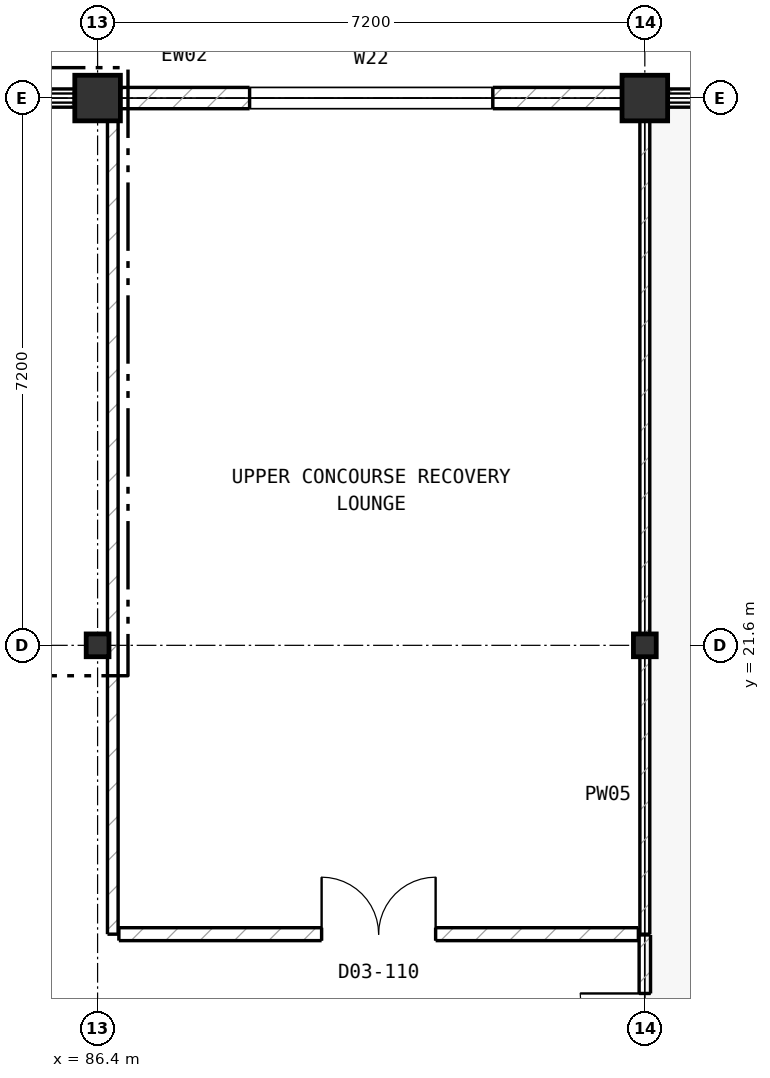
"""IFC4 building model, lengths in metres.
Left out: names, types, materials, properties, quantities, classifications, styles, units other than length and angle.
Written with IfcOpenShell. Run it as: python <this file> out.ifc"""

import sys

from ifc_helpers import new_model, si_unit, direction, frame, frame_2d, origin, origin_2d, place, context, subcontext, project, spatial, rectangle, hollow_rectangle, extrude, element, fill, save


model = new_model("IFC4")
c1 = context("Model", 3, precision=1e-05, world=origin(), true_north=direction((0.0, 1.0)))
c2 = subcontext(c1, "Body", "Model", "MODEL_VIEW")
j1 = project(units=[si_unit("LENGTHUNIT", "METRE"), si_unit("PLANEANGLEUNIT", "RADIAN")], contexts=[c1])
p1 = place(None, origin())
s1 = spatial("IfcSite", under=j1, at=p1, CompositionType="ELEMENT")
p2 = place(p1, origin())
s2 = spatial("IfcBuilding", under=s1, at=p2, CompositionType="ELEMENT")
p3 = place(p2, frame((0.0, 0.0, 16.0)))
s3 = spatial("IfcBuildingStorey", under=s2, at=p3, CompositionType="ELEMENT", Elevation=16.0)
p4 = place(p3, frame((86.4, 21.6, 0.0), z_axis=(0.0, 0.0, 1.0), x_axis=(1.0, 0.0, 0.0)))
e1 = element("IfcColumn", 1, at=p4, inside=s3, PredefinedType="COLUMN", context=c2, shape_type="SweptSolid", body=[
    extrude(hollow_rectangle(XDim=0.3, YDim=0.3, WallThickness=0.012, at=origin_2d()), origin(), (0.0, 0.0, 1.0), 4.4),
])
p5 = place(p3, frame((86.4, 28.8, 0.0), z_axis=(0.0, 0.0, 1.0), x_axis=(1.0, 0.0, 0.0)))
e2 = element("IfcColumn", 2, at=p5, inside=s3, PredefinedType="COLUMN", context=c2, shape_type="SweptSolid", body=[
    extrude(rectangle(XDim=0.6, YDim=0.6, at=origin_2d()), origin(), (0.0, 0.0, 1.0), 4.4),
])
p6 = place(p3, frame((93.6, 21.6, 0.0), z_axis=(0.0, 0.0, 1.0), x_axis=(1.0, 0.0, 0.0)))
e3 = element("IfcColumn", 3, at=p6, inside=s3, PredefinedType="COLUMN", context=c2, shape_type="SweptSolid", body=[
    extrude(hollow_rectangle(XDim=0.3, YDim=0.3, WallThickness=0.012, at=origin_2d()), origin(), (0.0, 0.0, 1.0), 4.4),
])
p7 = place(p3, frame((93.6, 28.8, 0.0), z_axis=(0.0, 0.0, 1.0), x_axis=(1.0, 0.0, 0.0)))
e4 = element("IfcColumn", 4, at=p7, inside=s3, PredefinedType="COLUMN", context=c2, shape_type="SweptSolid", body=[
    extrude(rectangle(XDim=0.6, YDim=0.6, at=origin_2d()), origin(), (0.0, 0.0, 1.0), 4.4),
])
p8 = place(p3, frame((79.485, 28.8, 0.0), z_axis=(0.0, 0.0, 1.0), x_axis=(1.0, 0.0, 0.0)))
e5 = element("IfcWall", 5, at=p8, inside=s3, PredefinedType="SOLIDWALL", context=c2, shape_type="SweptSolid", body=[
    extrude(rectangle(XDim=6.63, YDim=0.24, at=frame_2d((3.315, 0.0))), origin(), (0.0, 0.0, 1.0), 0.9),
])
p9 = place(p3, frame((86.685, 28.8, 0.0), z_axis=(0.0, 0.0, 1.0), x_axis=(1.0, 0.0, 0.0)))
e6 = element("IfcWall", 6, at=p9, inside=s3, PredefinedType="SOLIDWALL", context=c2, shape_type="SweptSolid", body=[
    extrude(rectangle(XDim=6.63, YDim=0.28, at=frame_2d((3.315, 0.0))), origin(), (0.0, 0.0, 1.0), 4.12),
])
p10 = place(p9, frame((1.715, 0.0, 2.15)))
e7 = element("IfcOpeningElement", 7, at=p10, cuts=e6, PredefinedType="OPENING", context=c2, shape_type="SweptSolid", body=[
    extrude(rectangle(XDim=3.2, YDim=1.2, at=frame_2d((1.6, 0.6))), frame((0.0, 0.15, 0.0), z_axis=(0.0, -1.0, 0.0), x_axis=(1.0, 0.0, 0.0)), (0.0, 0.0, 1.0), 0.3),
])
p11 = place(p3, frame((93.885, 28.8, 0.0), z_axis=(0.0, 0.0, 1.0), x_axis=(1.0, 0.0, 0.0)))
e8 = element("IfcWall", 8, at=p11, inside=s3, PredefinedType="SOLIDWALL", context=c2, shape_type="SweptSolid", body=[
    extrude(rectangle(XDim=6.63, YDim=0.24, at=frame_2d((3.315, 0.0))), origin(), (0.0, 0.0, 1.0), 0.9),
])
p12 = place(p3, frame((86.6, 17.8, 0.0), z_axis=(0.0, 0.0, 1.0), x_axis=(0.0, 1.0, 0.0)))
e9 = element("IfcWall", 9, at=p12, inside=s3, PredefinedType="PARTITIONING", context=c2, shape_type="SweptSolid", body=[
    extrude(rectangle(XDim=10.7, YDim=0.14, at=frame_2d((5.35, 0.0))), origin(), (0.0, 0.0, 1.0), 4.12),
])
p13 = place(p3, frame((93.6, 17.8, 0.0), z_axis=(0.0, 0.0, 1.0), x_axis=(0.0, 1.0, 0.0)))
e10 = element("IfcWall", 10, at=p13, inside=s3, PredefinedType="PARTITIONING", context=c2, shape_type="SweptSolid", body=[
    extrude(rectangle(XDim=3.65, YDim=0.13, at=frame_2d((1.825, 0.0))), origin(), (0.0, 0.0, 1.0), 3.62),
])
p14 = place(p3, frame((93.6, 21.75, 0.0), z_axis=(0.0, 0.0, 1.0), x_axis=(0.0, 1.0, 0.0)))
e11 = element("IfcWall", 11, at=p14, inside=s3, PredefinedType="PARTITIONING", context=c2, shape_type="SweptSolid", body=[
    extrude(rectangle(XDim=6.75, YDim=0.13, at=frame_2d((3.375, 0.0))), origin(), (0.0, 0.0, 1.0), 3.62),
])
p15 = place(p3, frame((93.6, 14.55, 0.0), z_axis=(0.0, 0.0, 1.0), x_axis=(0.0, 1.0, 0.0)))
e12 = element("IfcWall", 12, at=p15, inside=s3, PredefinedType="PARTITIONING", context=c2, shape_type="SweptSolid", body=[
    extrude(rectangle(XDim=3.24, YDim=0.15, at=frame_2d((1.62, 0.0))), origin(), (0.0, 0.0, 1.0), 3.62),
])
p16 = place(p15, frame((0.77, 0.0, 0.0)))
e13 = element("IfcOpeningElement", 13, at=p16, cuts=e12, PredefinedType="OPENING", context=c2, shape_type="SweptSolid", body=[
    extrude(rectangle(XDim=1.7, YDim=2.3, at=frame_2d((0.85, 1.15))), frame((0.0, 0.085, 0.0), z_axis=(0.0, -1.0, 0.0), x_axis=(1.0, 0.0, 0.0)), (0.0, 0.0, 1.0), 0.17),
])
p17 = place(p3, frame((86.68, 17.8, 0.0), z_axis=(0.0, 0.0, 1.0), x_axis=(1.0, 0.0, 0.0)))
e14 = element("IfcWall", 14, at=p17, inside=s3, PredefinedType="PARTITIONING", context=c2, shape_type="SweptSolid", body=[
    extrude(rectangle(XDim=6.835, YDim=0.17, at=frame_2d((3.417, 0.0))), origin(), (0.0, 0.0, 1.0), 4.12),
])
p18 = place(p17, frame((2.667, 0.0, 0.0)))
e15 = element("IfcOpeningElement", 15, at=p18, cuts=e14, PredefinedType="OPENING", context=c2, shape_type="SweptSolid", body=[
    extrude(rectangle(XDim=1.5, YDim=2.2, at=frame_2d((0.75, 1.1))), frame((0.0, 0.095, 0.0), z_axis=(0.0, -1.0, 0.0), x_axis=(1.0, 0.0, 0.0)), (0.0, 0.0, 1.0), 0.19),
])
p19 = place(p10, origin())
e16 = element("IfcWindow", 16, at=p19, inside=s3, PartitioningType="SINGLE_PANEL", PredefinedType="WINDOW", context=c2, shape_type="SweptSolid", body=[
    extrude(rectangle(XDim=3.2, YDim=1.2, at=frame_2d((1.6, 0.6))), frame((0.0, 0.03, 0.0), z_axis=(0.0, -1.0, 0.0), x_axis=(1.0, 0.0, 0.0)), (0.0, 0.0, 1.0), 0.06),
])
fill(e7, e16)
p20 = place(p16, origin())
e17 = element("IfcDoor", 17, at=p20, inside=s3, OperationType="DOUBLE_DOOR_SINGLE_SWING", PredefinedType="DOOR", context=c2, shape_type="SweptSolid", body=[
    extrude(rectangle(XDim=1.7, YDim=2.3, at=frame_2d((0.85, 1.15))), frame((0.0, 0.025, 0.0), z_axis=(0.0, -1.0, 0.0), x_axis=(1.0, 0.0, 0.0)), (0.0, 0.0, 1.0), 0.05),
])
fill(e13, e17)
p21 = place(p18, origin())
e18 = element("IfcDoor", 18, at=p21, inside=s3, OperationType="DOUBLE_DOOR_SINGLE_SWING", PredefinedType="DOOR", context=c2, shape_type="SweptSolid", body=[
    extrude(rectangle(XDim=1.5, YDim=2.2, at=frame_2d((0.75, 1.1))), frame((0.0, 0.025, 0.0), z_axis=(0.0, -1.0, 0.0), x_axis=(1.0, 0.0, 0.0)), (0.0, 0.0, 1.0), 0.05),
])
fill(e15, e18)
save(model, sys.argv[1])
